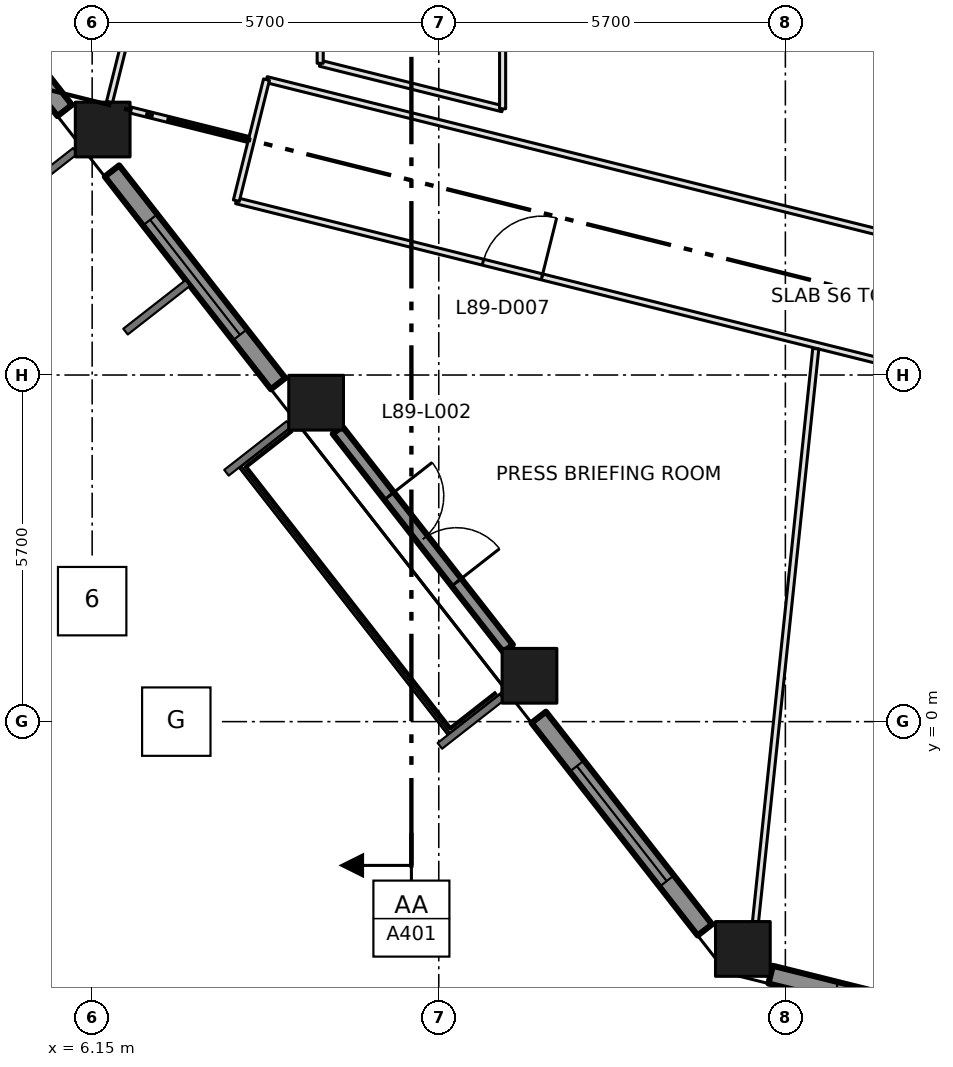
"""IFC4 building model, lengths in metres.
Left out: names, types, materials, properties, quantities, classifications, styles, units other than length and angle.
Written with IfcOpenShell. Run it as: python <this file> out.ifc"""

import sys

from ifc_helpers import new_model, si_unit, direction, frame, frame_2d, origin, origin_2d, place, context, subcontext, project, spatial, rectangle, extrude, element, fill, save


model = new_model("IFC4")
c1 = context("Model", 3, precision=1e-05, world=origin(), true_north=direction((0.0, 1.0)))
c2 = subcontext(c1, "Body", "Model", "MODEL_VIEW")
j1 = project(units=[si_unit("LENGTHUNIT", "METRE"), si_unit("PLANEANGLEUNIT", "RADIAN")], contexts=[c1])
p1 = place(None, origin())
s1 = spatial("IfcSite", under=j1, at=p1, CompositionType="ELEMENT")
p2 = place(p1, origin())
s2 = spatial("IfcBuilding", under=s1, at=p2, CompositionType="ELEMENT")
p3 = place(p2, frame((0.0, 0.0, 387.6)))
s3 = spatial("IfcBuildingStorey", under=s2, at=p3, CompositionType="ELEMENT", Elevation=387.6)
for number, where, z_axis, x_axis in (
    (1, (16.851, -3.738, 0.0), (0.0, 0.0, 1.0), (1.0, 0.0, 0.0)),
    (2, (13.342, 0.754, 0.0), (0.0, 0.0, 1.0), (1.0, 0.0, 0.0)),
    (3, (9.833, 5.245, 0.0), (0.0, 0.0, 1.0), (1.0, 0.0, 0.0)),
    (4, (6.323, 9.737, 0.0), (0.0, 0.0, 1.0), (1.0, 0.0, 0.0)),
):
    element("IfcColumn", number, at=place(p3, frame(where, z_axis=z_axis, x_axis=x_axis)), inside=s3, PredefinedType="COLUMN", context=c2, shape_type="SweptSolid", body=[
        extrude(rectangle(XDim=0.9, YDim=0.9, at=origin_2d()), origin(), (0.0, 0.0, 1.0), 4.2),
    ])
p4 = place(p3, frame((2.967, 13.547, 0.0), z_axis=(0.0, 0.0, 1.0), x_axis=(0.615486001463, -0.788147817356, 0.0)))
e5 = element("IfcWall", 5, at=p4, inside=s3, PredefinedType="SOLIDWALL", context=c2, shape_type="SweptSolid", body=[
    extrude(rectangle(XDim=4.437, YDim=0.3, at=frame_2d((2.219, 0.0))), origin(), (0.0, 0.0, 1.0), 3.2),
])
p5 = place(p4, frame((1.018, 0.0, 0.8)))
e6 = element("IfcOpeningElement", 6, at=p5, cuts=e5, PredefinedType="OPENING", context=c2, shape_type="SweptSolid", body=[
    extrude(rectangle(XDim=2.4, YDim=2.1, at=frame_2d((1.2, 1.05))), frame((0.0, 0.16, 0.0), z_axis=(0.0, -1.0, 0.0), x_axis=(1.0, 0.0, 0.0)), (0.0, 0.0, 1.0), 0.32),
])
p6 = place(p3, frame((6.476, 9.055, 0.0), z_axis=(0.0, 0.0, 1.0), x_axis=(0.615649380255, -0.788020203162, 0.0)))
e7 = element("IfcWall", 7, at=p6, inside=s3, PredefinedType="SOLIDWALL", context=c2, shape_type="SweptSolid", body=[
    extrude(rectangle(XDim=4.438, YDim=0.3, at=frame_2d((2.219, 0.0))), origin(), (0.0, 0.0, 1.0), 3.2),
])
p7 = place(p6, frame((1.019, 0.0, 0.8)))
e8 = element("IfcOpeningElement", 8, at=p7, cuts=e7, PredefinedType="OPENING", context=c2, shape_type="SweptSolid", body=[
    extrude(rectangle(XDim=2.4, YDim=2.1, at=frame_2d((1.2, 1.05))), frame((0.0, 0.16, 0.0), z_axis=(0.0, -1.0, 0.0), x_axis=(1.0, 0.0, 0.0)), (0.0, 0.0, 1.0), 0.32),
])
p8 = place(p3, frame((10.185, 4.795, 0.0), z_axis=(0.0, 0.0, 1.0), x_axis=(0.615589972315, -0.788066612657, 0.0)))
e9 = element("IfcWall", 9, at=p8, inside=s3, PredefinedType="SOLIDWALL", context=c2, shape_type="SweptSolid", body=[
    extrude(rectangle(XDim=4.556, YDim=0.2, at=frame_2d((2.278, 0.0))), origin(), (0.0, 0.0, 1.0), 3.2),
])
p9 = place(p8, frame((1.378, 0.0, 0.0)))
e10 = element("IfcOpeningElement", 10, at=p9, cuts=e9, PredefinedType="OPENING", context=c2, shape_type="SweptSolid", body=[
    extrude(rectangle(XDim=1.8, YDim=2.9, at=frame_2d((0.9, 1.45))), frame((0.0, 0.11, 0.0), z_axis=(0.0, -1.0, 0.0), x_axis=(1.0, 0.0, 0.0)), (0.0, 0.0, 1.0), 0.22),
])
p10 = place(p3, frame((8.89, 4.292, 0.0), z_axis=(0.0, 0.0, 1.0), x_axis=(0.615636085037, -0.788030590016, 0.0)))
e11 = element("IfcWall", 11, at=p10, inside=s3, PredefinedType="SOLIDWALL", context=c2, shape_type="SweptSolid", body=[
    extrude(rectangle(XDim=5.359, YDim=0.4, at=frame_2d((2.679, 0.0))), origin(), (0.0, 0.0, 1.0), 0.3),
])
p11 = place(p3, frame((13.494, 0.071, 0.0), z_axis=(0.0, 0.0, 1.0), x_axis=(0.615763624226, -0.787930935476, 0.0)))
e12 = element("IfcWall", 12, at=p11, inside=s3, PredefinedType="SOLIDWALL", context=c2, shape_type="SweptSolid", body=[
    extrude(rectangle(XDim=4.437, YDim=0.3, at=frame_2d((2.219, 0.0))), origin(), (0.0, 0.0, 1.0), 3.2),
])
p12 = place(p11, frame((1.018, 0.0, 0.8)))
e13 = element("IfcOpeningElement", 13, at=p12, cuts=e12, PredefinedType="OPENING", context=c2, shape_type="SweptSolid", body=[
    extrude(rectangle(XDim=2.4, YDim=2.1, at=frame_2d((1.2, 1.05))), frame((0.0, 0.16, 0.0), z_axis=(0.0, -1.0, 0.0), x_axis=(1.0, 0.0, 0.0)), (0.0, 0.0, 1.0), 0.32),
])
p13 = place(p3, frame((17.308, -4.161, 0.0), z_axis=(0.0, 0.0, 1.0), x_axis=(0.970294992984, -0.241924836652, 0.0)))
e14 = element("IfcWall", 14, at=p13, inside=s3, PredefinedType="SOLIDWALL", context=c2, shape_type="SweptSolid", body=[
    extrude(rectangle(XDim=4.609, YDim=0.3, at=frame_2d((2.304, 0.0))), origin(), (0.0, 0.0, 1.0), 3.2),
])
p14 = place(p13, frame((1.105, 0.0, 0.8)))
e15 = element("IfcOpeningElement", 15, at=p14, cuts=e14, PredefinedType="OPENING", context=c2, shape_type="SweptSolid", body=[
    extrude(rectangle(XDim=2.4, YDim=2.1, at=frame_2d((1.2, 1.05))), frame((0.0, 0.16, 0.0), z_axis=(0.0, -1.0, 0.0), x_axis=(1.0, 0.0, 0.0)), (0.0, 0.0, 1.0), 0.32),
])
p15 = place(p3, frame((8.521, 8.567, 0.0), z_axis=(0.0, 0.0, 1.0), x_axis=(0.970301223092, -0.241899848006, 0.0)))
e16 = element("IfcWall", 16, at=p15, inside=s3, PredefinedType="PARTITIONING", context=c2, shape_type="SweptSolid", body=[
    extrude(rectangle(XDim=19.879, YDim=0.1, at=frame_2d((9.94, 0.0))), origin(), (0.0, 0.0, 1.0), 3.9),
])
p16 = place(p15, frame((13.707, 0.0, 0.0)))
e17 = element("IfcOpeningElement", 17, at=p16, cuts=e16, PredefinedType="OPENING", context=c2, shape_type="SweptSolid", body=[
    extrude(rectangle(XDim=1.8, YDim=2.1, at=frame_2d((0.9, 1.05))), frame((0.0, 0.06, 0.0), z_axis=(0.0, -1.0, 0.0), x_axis=(1.0, 0.0, 0.0)), (0.0, 0.0, 1.0), 0.12),
])
p17 = place(p15, frame((4.18, 0.0, 0.0)))
e18 = element("IfcOpeningElement", 18, at=p17, cuts=e16, PredefinedType="OPENING", context=c2, shape_type="SweptSolid", body=[
    extrude(rectangle(XDim=1.0, YDim=2.1, at=frame_2d((0.5, 1.05))), frame((0.0, 0.06, 0.0), z_axis=(0.0, -1.0, 0.0), x_axis=(1.0, 0.0, 0.0)), (0.0, 0.0, 1.0), 0.12),
])
p18 = place(p3, frame((9.017, 10.558, 0.0), z_axis=(0.0, 0.0, 1.0), x_axis=(0.970297621765, -0.241914293082, 0.0)))
e19 = element("IfcWall", 19, at=p18, inside=s3, PredefinedType="PARTITIONING", context=c2, shape_type="SweptSolid", body=[
    extrude(rectangle(XDim=19.879, YDim=0.1, at=frame_2d((9.94, 0.0))), origin(), (0.0, 0.0, 1.0), 3.9),
])
p19 = place(p3, frame((9.017, 10.558, 0.0), z_axis=(0.0, 0.0, 1.0), x_axis=(-0.241751728323, -0.970338137895, 0.0)))
e20 = element("IfcWall", 20, at=p19, inside=s3, PredefinedType="PARTITIONING", context=c2, shape_type="SweptSolid", body=[
    extrude(rectangle(XDim=2.052, YDim=0.1, at=frame_2d((1.026, 0.0))), origin(), (0.0, 0.0, 1.0), 3.9),
])
p20 = place(p3, frame((9.9, 10.826, 0.0), z_axis=(0.0, 0.0, 1.0), x_axis=(0.970290953223, -0.241941038466, 0.0)))
e21 = element("IfcWall", 21, at=p20, inside=s3, PredefinedType="PARTITIONING", context=c2, shape_type="SweptSolid", body=[
    extrude(rectangle(XDim=3.092, YDim=0.1, at=frame_2d((1.546, 0.0))), origin(), (0.0, 0.0, 1.0), 3.9),
])
p21 = place(p3, frame((9.9, 12.2, 0.0), z_axis=(0.0, 0.0, 1.0), x_axis=(0.0, -1.0, 0.0)))
e22 = element("IfcWall", 22, at=p21, inside=s3, PredefinedType="PARTITIONING", context=c2, shape_type="SweptSolid", body=[
    extrude(rectangle(XDim=1.374, YDim=0.1, at=frame_2d((0.687, 0.0))), origin(), (0.0, 0.0, 1.0), 3.9),
])
p22 = place(p3, frame((12.9, 10.078, 0.0), z_axis=(0.0, 0.0, 1.0), x_axis=(0.0, 1.0, 0.0)))
e23 = element("IfcWall", 23, at=p22, inside=s3, PredefinedType="PARTITIONING", context=c2, shape_type="SweptSolid", body=[
    extrude(rectangle(XDim=4.022, YDim=0.1, at=frame_2d((2.011, 0.0))), origin(), (0.0, 0.0, 1.0), 3.9),
])
p23 = place(p22, frame((1.58, 0.0, 0.0)))
e24 = element("IfcOpeningElement", 24, at=p23, cuts=e23, PredefinedType="OPENING", context=c2, shape_type="SweptSolid", body=[
    extrude(rectangle(XDim=1.0, YDim=2.1, at=frame_2d((0.5, 1.05))), frame((0.0, 0.06, 0.0), z_axis=(0.0, -1.0, 0.0), x_axis=(1.0, 0.0, 0.0)), (0.0, 0.0, 1.0), 0.12),
])
p24 = place(p3, frame((6.922, 12.138, 0.0), z_axis=(0.0, 0.0, 1.0), x_axis=(-0.24222136375, -0.97022101139, 0.0)))
e25 = element("IfcWall", 25, at=p24, inside=s3, PredefinedType="PARTITIONING", context=c2, shape_type="SweptSolid", body=[
    extrude(rectangle(XDim=2.011, YDim=0.1, at=frame_2d((1.005, 0.0))), origin(), (0.0, 0.0, 1.0), 3.9),
])
p25 = place(p3, frame((8.72, 9.574, 0.0), z_axis=(0.0, 0.0, 1.0), x_axis=(-0.970221168815, 0.24222073318, 0.0)))
e26 = element("IfcWall", 26, at=p25, inside=s3, PredefinedType="PARTITIONING", context=c2, shape_type="SweptSolid", body=[
    extrude(rectangle(XDim=2.007, YDim=0.1, at=frame_2d((1.003, 0.0))), origin(), (0.0, 0.0, 1.0), 3.9),
])
p26 = place(p3, frame((17.059, -3.288, 0.0), z_axis=(0.0, 0.0, 1.0), x_axis=(0.104608315677, 0.994513499301, 0.0)))
e27 = element("IfcWall", 27, at=p26, inside=s3, PredefinedType="PARTITIONING", context=c2, shape_type="SweptSolid", body=[
    extrude(rectangle(XDim=9.473, YDim=0.1, at=frame_2d((4.737, 0.0))), origin(), (0.0, 0.0, 1.0), 3.9),
])
p27 = place(p7, origin())
e28 = element("IfcWindow", 28, at=p27, inside=s3, PartitioningType="DOUBLE_PANEL_VERTICAL", PredefinedType="WINDOW", context=c2, shape_type="SweptSolid", body=[
    extrude(rectangle(XDim=2.4, YDim=2.1, at=frame_2d((1.2, 1.05))), frame((0.0, 0.03, 0.0), z_axis=(0.0, -1.0, 0.0), x_axis=(1.0, 0.0, 0.0)), (0.0, 0.0, 1.0), 0.06),
])
fill(e8, e28)
p28 = place(p9, origin())
e29 = element("IfcDoor", 29, at=p28, inside=s3, OperationType="DOUBLE_DOOR_SINGLE_SWING", PredefinedType="DOOR", context=c2, shape_type="SweptSolid", body=[
    extrude(rectangle(XDim=1.8, YDim=2.9, at=frame_2d((0.9, 1.45))), frame((0.0, 0.025, 0.0), z_axis=(0.0, -1.0, 0.0), x_axis=(1.0, 0.0, 0.0)), (0.0, 0.0, 1.0), 0.05),
])
fill(e10, e29)
p29 = place(p12, origin())
e30 = element("IfcWindow", 30, at=p29, inside=s3, PartitioningType="DOUBLE_PANEL_VERTICAL", PredefinedType="WINDOW", context=c2, shape_type="SweptSolid", body=[
    extrude(rectangle(XDim=2.4, YDim=2.1, at=frame_2d((1.2, 1.05))), frame((0.0, 0.03, 0.0), z_axis=(0.0, -1.0, 0.0), x_axis=(1.0, 0.0, 0.0)), (0.0, 0.0, 1.0), 0.06),
])
fill(e13, e30)
p30 = place(p17, origin())
e31 = element("IfcDoor", 31, at=p30, inside=s3, OperationType="SINGLE_SWING_RIGHT", PredefinedType="DOOR", context=c2, shape_type="SweptSolid", body=[
    extrude(rectangle(XDim=1.0, YDim=2.1, at=frame_2d((0.5, 1.05))), frame((0.0, 0.025, 0.0), z_axis=(0.0, -1.0, 0.0), x_axis=(1.0, 0.0, 0.0)), (0.0, 0.0, 1.0), 0.05),
])
fill(e18, e31)
save(model, sys.argv[1])
